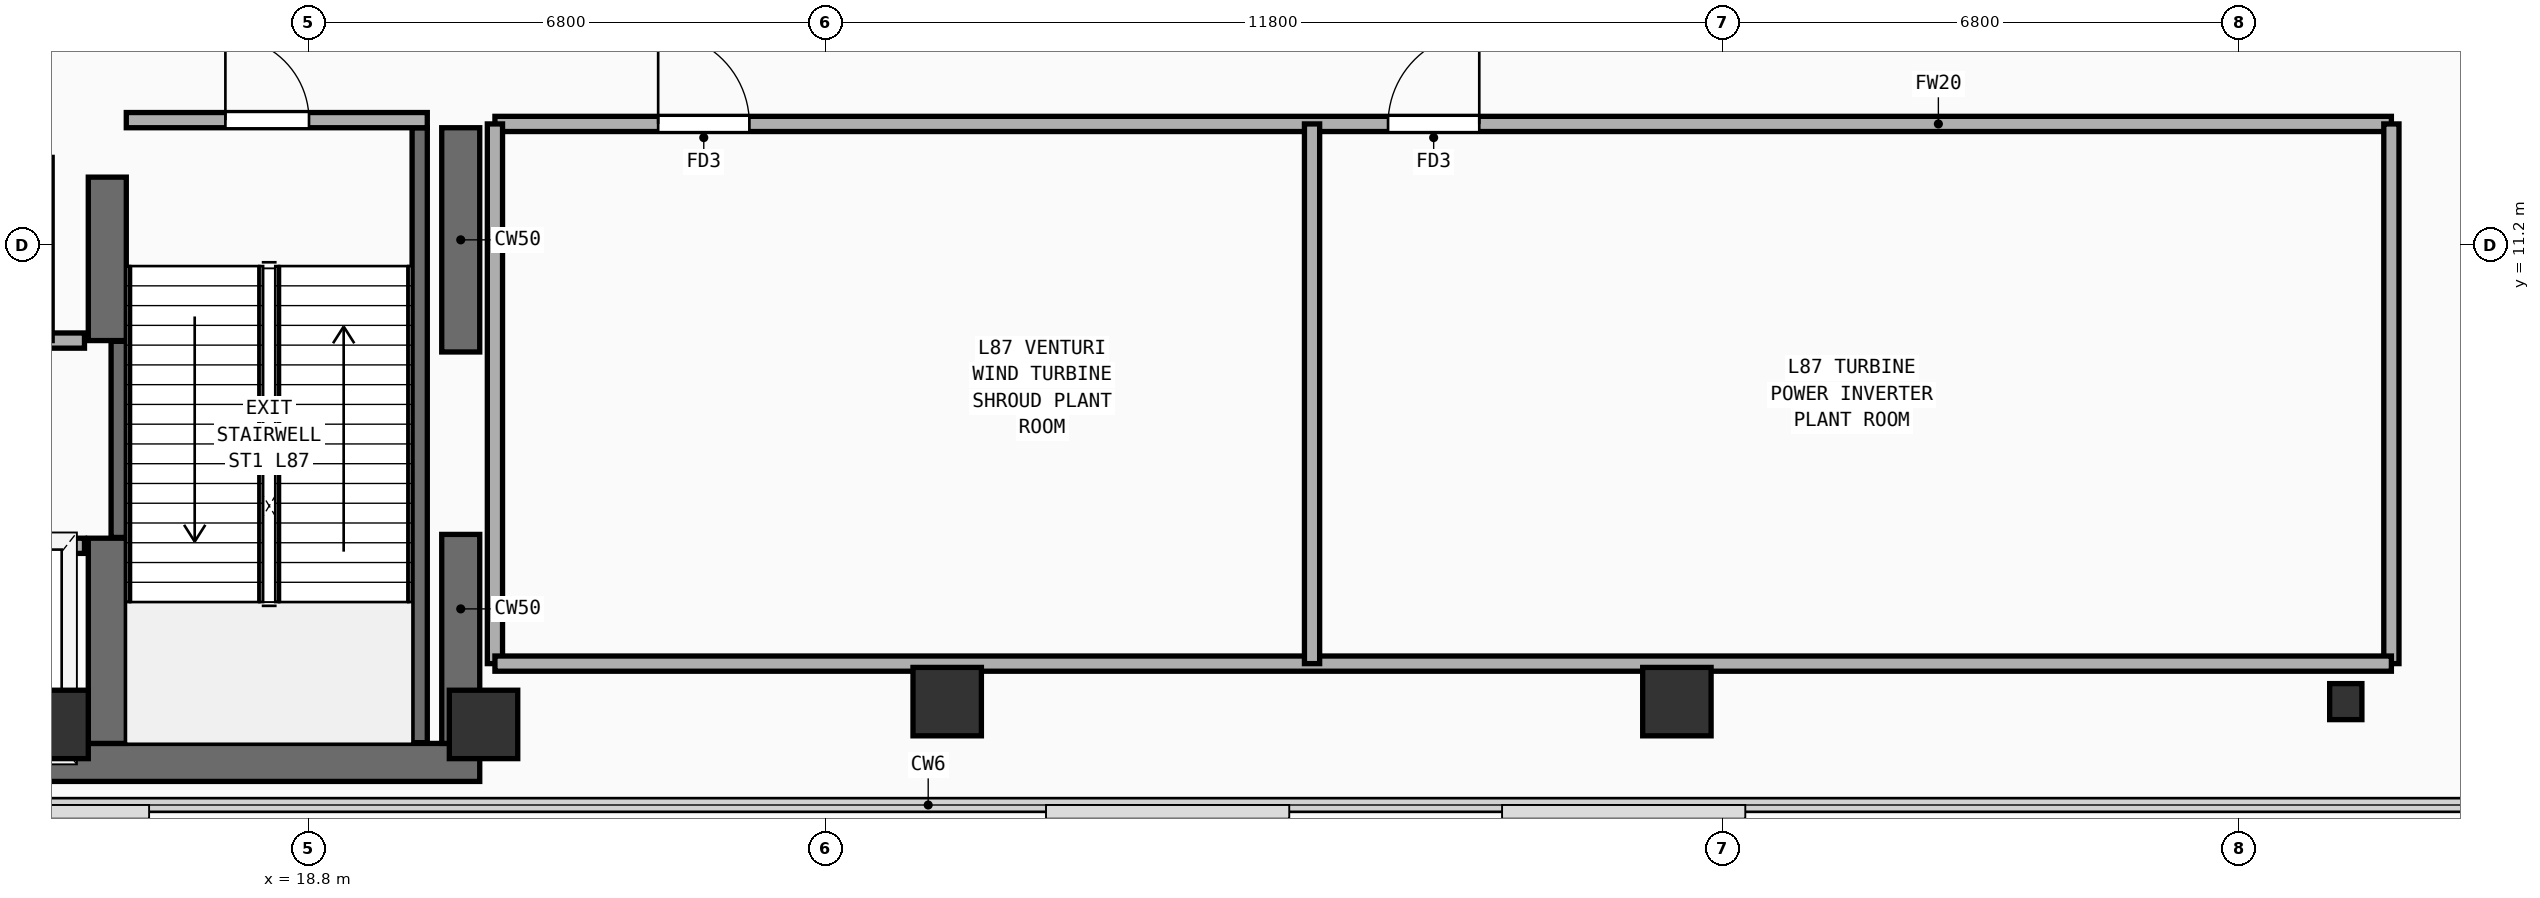
"""IFC4 building model, lengths in metres.
Left out: names, types, materials, properties, quantities, classifications, styles, units other than length and angle.
Written with IfcOpenShell. Run it as: python <this file> out.ifc"""

import sys

from ifc_helpers import new_model, si_unit, direction, frame, frame_2d, origin, origin_2d, place, context, subcontext, project, spatial, rectangle, i_section, extrude, element, fill, save


model = new_model("IFC4")
c1 = context("Model", 3, precision=1e-05, world=origin(), true_north=direction((0.0, 1.0)))
c2 = subcontext(c1, "Body", "Model", "MODEL_VIEW")
j1 = project(units=[si_unit("LENGTHUNIT", "METRE"), si_unit("PLANEANGLEUNIT", "RADIAN")], contexts=[c1])
p1 = place(None, origin())
s1 = spatial("IfcSite", under=j1, at=p1, CompositionType="ELEMENT")
p2 = place(p1, origin())
s2 = spatial("IfcBuilding", under=s1, at=p2, CompositionType="ELEMENT")
p3 = place(p2, frame((0.0, 0.0, 338.8)))
s3 = spatial("IfcBuildingStorey", under=s2, at=p3, CompositionType="ELEMENT", Elevation=338.8)
p4 = place(p3, frame((7.2, 4.4, 0.0), z_axis=(0.0, 0.0, 1.0), x_axis=(1.0, 0.0, 0.0)))
e1 = element("IfcWall", 1, at=p4, inside=s3, PredefinedType="SHEAR", context=c2, shape_type="SweptSolid", body=[
    extrude(rectangle(XDim=13.85, YDim=0.5, at=frame_2d((6.925, 0.0))), origin(), (0.0, 0.0, 1.0), 5.02),
])
p5 = place(p3, frame((20.8, 4.65, 0.0), z_axis=(0.0, 0.0, 1.0), x_axis=(0.0, 1.0, 0.0)))
e2 = element("IfcWall", 2, at=p5, inside=s3, PredefinedType="SHEAR", context=c2, shape_type="SweptSolid", body=[
    extrude(rectangle(XDim=2.75, YDim=0.5, at=frame_2d((1.375, 0.0))), origin(), (0.0, 0.0, 1.0), 5.02),
])
p6 = place(p3, frame((20.8, 9.8, 0.0), z_axis=(0.0, 0.0, 1.0), x_axis=(0.0, 1.0, 0.0)))
e3 = element("IfcWall", 3, at=p6, inside=s3, PredefinedType="SHEAR", context=c2, shape_type="SweptSolid", body=[
    extrude(rectangle(XDim=2.95, YDim=0.5, at=frame_2d((1.475, 0.0))), origin(), (0.0, 0.0, 1.0), 5.02),
])
p7 = place(p3, frame((16.15, 4.65, 0.0), z_axis=(0.0, 0.0, 1.0), x_axis=(0.0, 1.0, 0.0)))
e4 = element("IfcWall", 4, at=p7, inside=s3, PredefinedType="SHEAR", context=c2, shape_type="SweptSolid", body=[
    extrude(rectangle(XDim=2.7, YDim=0.5, at=frame_2d((1.35, 0.0))), origin(), (0.0, 0.0, 1.0), 5.02),
])
p8 = place(p3, frame((16.15, 9.95, 0.0), z_axis=(0.0, 0.0, 1.0), x_axis=(0.0, 1.0, 0.0)))
e5 = element("IfcWall", 5, at=p8, inside=s3, PredefinedType="SHEAR", context=c2, shape_type="SweptSolid", body=[
    extrude(rectangle(XDim=2.15, YDim=0.5, at=frame_2d((1.075, 0.0))), origin(), (0.0, 0.0, 1.0), 5.02),
])
for number, where, z_axis, x_axis in (
    (6, (15.45, 4.9, 0.0), (0.0, 0.0, 1.0), (1.0, 0.0, 0.0)),
    (7, (21.1, 4.9, 0.0), (0.0, 0.0, 1.0), (1.0, 0.0, 0.0)),
    (8, (27.2, 5.2, 0.0), (0.0, 0.0, 1.0), (1.0, 0.0, 0.0)),
    (9, (36.8, 5.2, 0.0), (0.0, 0.0, 1.0), (1.0, 0.0, 0.0)),
):
    element("IfcColumn", number, at=place(p3, frame(where, z_axis=z_axis, x_axis=x_axis)), inside=s3, PredefinedType="COLUMN", context=c2, shape_type="SweptSolid", body=[
        extrude(rectangle(XDim=0.9, YDim=0.9, at=origin_2d()), origin(), (0.0, 0.0, 1.0), 5.02),
    ])
p9 = place(p3, frame((45.6, 5.2, 0.0), z_axis=(0.0, 0.0, 1.0), x_axis=(1.0, 0.0, 0.0)))
e10 = element("IfcColumn", 10, at=p9, inside=s3, PredefinedType="COLUMN", context=c2, shape_type="SweptSolid", body=[
    extrude(i_section(OverallWidth=0.424, OverallDepth=0.474, WebThickness=0.043, FlangeThickness=0.07, FilletRadius=0.015, at=origin_2d()), origin(), (0.0, 0.0, 1.0), 5.02),
])
p10 = place(p3, frame((16.3, 7.36, 0.0), z_axis=(0.0, 0.0, 1.0), x_axis=(0.0, 1.0, 0.0)))
e11 = element("IfcWall", 11, at=p10, inside=s3, PredefinedType="SHEAR", context=c2, shape_type="SweptSolid", body=[
    extrude(rectangle(XDim=2.58, YDim=0.2, at=frame_2d((1.29, 0.0))), origin(), (0.0, 0.0, 1.0), 5.02),
])
p11 = place(p3, frame((20.26, 4.66, 0.0), z_axis=(0.0, 0.0, 1.0), x_axis=(0.0, 1.0, 0.0)))
e12 = element("IfcWall", 12, at=p11, inside=s3, PredefinedType="SHEAR", context=c2, shape_type="SweptSolid", body=[
    extrude(rectangle(XDim=8.09, YDim=0.2, at=frame_2d((4.045, 0.0))), origin(), (0.0, 0.0, 1.0), 5.02),
])
p12 = place(p3, frame((16.4, 12.85, 0.0), z_axis=(0.0, 0.0, 1.0), x_axis=(1.0, 0.0, 0.0)))
e13 = element("IfcWall", 13, at=p12, inside=s3, PredefinedType="PARTITIONING", context=c2, shape_type="SweptSolid", body=[
    extrude(rectangle(XDim=3.96, YDim=0.2, at=frame_2d((1.98, 0.0))), origin(), (0.0, 0.0, 1.0), 5.02),
])
p13 = place(p12, frame((1.304, 0.0, 0.0)))
e14 = element("IfcOpeningElement", 14, at=p13, cuts=e13, PredefinedType="OPENING", context=c2, shape_type="SweptSolid", body=[
    extrude(rectangle(XDim=1.1, YDim=2.2, at=frame_2d((0.55, 1.1))), frame((0.0, 0.11, 0.0), z_axis=(0.0, -1.0, 0.0), x_axis=(1.0, 0.0, 0.0)), (0.0, 0.0, 1.0), 0.22),
])
p14 = place(p3, frame((7.5, 7.25, 0.0), z_axis=(0.0, 0.0, 1.0), x_axis=(1.0, 0.0, 0.0)))
e15 = element("IfcWall", 15, at=p14, inside=s3, PredefinedType="PARTITIONING", context=c2, shape_type="SweptSolid", body=[
    extrude(rectangle(XDim=8.35, YDim=0.2, at=frame_2d((4.175, 0.0))), origin(), (0.0, 0.0, 1.0), 5.02),
])
p15 = place(p14, frame((0.53, 0.0, 0.0)))
e16 = element("IfcOpeningElement", 16, at=p15, cuts=e15, PredefinedType="OPENING", context=c2, shape_type="SweptSolid", body=[
    extrude(rectangle(XDim=1.1, YDim=2.2, at=frame_2d((0.55, 1.1))), frame((0.0, 0.11, 0.0), z_axis=(0.0, -1.0, 0.0), x_axis=(1.0, 0.0, 0.0)), (0.0, 0.0, 1.0), 0.22),
])
p16 = place(p14, frame((2.37, 0.0, 0.0)))
e17 = element("IfcOpeningElement", 17, at=p16, cuts=e15, PredefinedType="OPENING", context=c2, shape_type="SweptSolid", body=[
    extrude(rectangle(XDim=1.1, YDim=2.2, at=frame_2d((0.55, 1.1))), frame((0.0, 0.11, 0.0), z_axis=(0.0, -1.0, 0.0), x_axis=(1.0, 0.0, 0.0)), (0.0, 0.0, 1.0), 0.22),
])
p17 = place(p14, frame((4.33, 0.0, 0.0)))
e18 = element("IfcOpeningElement", 18, at=p17, cuts=e15, PredefinedType="OPENING", context=c2, shape_type="SweptSolid", body=[
    extrude(rectangle(XDim=1.1, YDim=2.2, at=frame_2d((0.55, 1.1))), frame((0.0, 0.11, 0.0), z_axis=(0.0, -1.0, 0.0), x_axis=(1.0, 0.0, 0.0)), (0.0, 0.0, 1.0), 0.22),
])
p18 = place(p14, frame((6.5, 0.0, 0.0)))
e19 = element("IfcOpeningElement", 19, at=p18, cuts=e15, PredefinedType="OPENING", context=c2, shape_type="SweptSolid", body=[
    extrude(rectangle(XDim=1.1, YDim=2.2, at=frame_2d((0.55, 1.1))), frame((0.0, 0.11, 0.0), z_axis=(0.0, -1.0, 0.0), x_axis=(1.0, 0.0, 0.0)), (0.0, 0.0, 1.0), 0.22),
])
p19 = place(p3, frame((7.5, 9.95, 0.0), z_axis=(0.0, 0.0, 1.0), x_axis=(1.0, 0.0, 0.0)))
e20 = element("IfcWall", 20, at=p19, inside=s3, PredefinedType="PARTITIONING", context=c2, shape_type="SweptSolid", body=[
    extrude(rectangle(XDim=8.35, YDim=0.2, at=frame_2d((4.175, 0.0))), origin(), (0.0, 0.0, 1.0), 5.02),
])
p20 = place(p3, frame((15.35, 9.95, 0.0), z_axis=(0.0, 0.0, 1.0), x_axis=(0.0, 1.0, 0.0)))
e21 = element("IfcWall", 21, at=p20, inside=s3, PredefinedType="PARTITIONING", context=c2, shape_type="SweptSolid", body=[
    extrude(rectangle(XDim=2.41, YDim=0.15, at=frame_2d((1.205, 0.0))), origin(), (0.0, 0.0, 1.0), 5.02),
])
p21 = place(p3, frame((21.25, 12.8, 0.0), z_axis=(0.0, 0.0, 1.0), x_axis=(1.0, 0.0, 0.0)))
e22 = element("IfcWall", 22, at=p21, inside=s3, PredefinedType="PARTITIONING", context=c2, shape_type="SweptSolid", body=[
    extrude(rectangle(XDim=24.95, YDim=0.2, at=frame_2d((12.475, 0.0))), origin(), (0.0, 0.0, 1.0), 5.02),
])
p22 = place(p21, frame((2.147, 0.0, 0.0)))
e23 = element("IfcOpeningElement", 23, at=p22, cuts=e22, PredefinedType="OPENING", context=c2, shape_type="SweptSolid", body=[
    extrude(rectangle(XDim=1.2, YDim=2.25, at=frame_2d((0.6, 1.125))), frame((0.0, 0.11, 0.0), z_axis=(0.0, -1.0, 0.0), x_axis=(1.0, 0.0, 0.0)), (0.0, 0.0, 1.0), 0.22),
])
p23 = place(p21, frame((11.75, 0.0, 0.0)))
e24 = element("IfcOpeningElement", 24, at=p23, cuts=e22, PredefinedType="OPENING", context=c2, shape_type="SweptSolid", body=[
    extrude(rectangle(XDim=1.2, YDim=2.25, at=frame_2d((0.6, 1.125))), frame((0.0, 0.11, 0.0), z_axis=(0.0, -1.0, 0.0), x_axis=(1.0, 0.0, 0.0)), (0.0, 0.0, 1.0), 0.22),
])
for number, where, z_axis, x_axis in (
    (25, (21.25, 5.7, 0.0), (0.0, 0.0, 1.0), (0.0, 1.0, 0.0)),
    (26, (46.2, 5.7, 0.0), (0.0, 0.0, 1.0), (0.0, 1.0, 0.0)),
):
    element("IfcWall", number, at=place(p3, frame(where, z_axis=z_axis, x_axis=x_axis)), inside=s3, PredefinedType="PARTITIONING", context=c2, shape_type="SweptSolid", body=[
        extrude(rectangle(XDim=7.1, YDim=0.2, at=frame_2d((3.55, 0.0))), origin(), (0.0, 0.0, 1.0), 5.02),
    ])
p24 = place(p3, frame((21.25, 5.7, 0.0), z_axis=(0.0, 0.0, 1.0), x_axis=(1.0, 0.0, 0.0)))
e27 = element("IfcWall", 27, at=p24, inside=s3, PredefinedType="PARTITIONING", context=c2, shape_type="SweptSolid", body=[
    extrude(rectangle(XDim=24.95, YDim=0.2, at=frame_2d((12.475, 0.0))), origin(), (0.0, 0.0, 1.0), 5.02),
])
p25 = place(p3, frame((32.0, 5.7, 0.0), z_axis=(0.0, 0.0, 1.0), x_axis=(0.0, 1.0, 0.0)))
e28 = element("IfcWall", 28, at=p25, inside=s3, PredefinedType="PARTITIONING", context=c2, shape_type="SweptSolid", body=[
    extrude(rectangle(XDim=7.1, YDim=0.2, at=frame_2d((3.55, 0.0))), origin(), (0.0, 0.0, 1.0), 5.02),
])
p26 = place(p13, frame((1.1, 0.0, 0.0), z_axis=(0.0, 0.0, 1.0), x_axis=(-1.0, 0.0, 0.0)))
e29 = element("IfcDoor", 29, at=p26, inside=s3, OperationType="SINGLE_SWING_RIGHT", PredefinedType="DOOR", context=c2, shape_type="SweptSolid", body=[
    extrude(rectangle(XDim=1.1, YDim=2.2, at=frame_2d((0.55, 1.1))), frame((0.0, 0.025, 0.0), z_axis=(0.0, -1.0, 0.0), x_axis=(1.0, 0.0, 0.0)), (0.0, 0.0, 1.0), 0.05),
])
fill(e14, e29)
p27 = place(p22, origin())
e30 = element("IfcDoor", 30, at=p27, inside=s3, OperationType="SINGLE_SWING_LEFT", PredefinedType="DOOR", context=c2, shape_type="SweptSolid", body=[
    extrude(rectangle(XDim=1.2, YDim=2.25, at=frame_2d((0.6, 1.125))), frame((0.0, 0.025, 0.0), z_axis=(0.0, -1.0, 0.0), x_axis=(1.0, 0.0, 0.0)), (0.0, 0.0, 1.0), 0.05),
])
fill(e23, e30)
p28 = place(p23, origin())
e31 = element("IfcDoor", 31, at=p28, inside=s3, OperationType="SINGLE_SWING_RIGHT", PredefinedType="DOOR", context=c2, shape_type="SweptSolid", body=[
    extrude(rectangle(XDim=1.2, YDim=2.25, at=frame_2d((0.6, 1.125))), frame((0.0, 0.025, 0.0), z_axis=(0.0, -1.0, 0.0), x_axis=(1.0, 0.0, 0.0)), (0.0, 0.0, 1.0), 0.05),
])
fill(e24, e31)
save(model, sys.argv[1])
